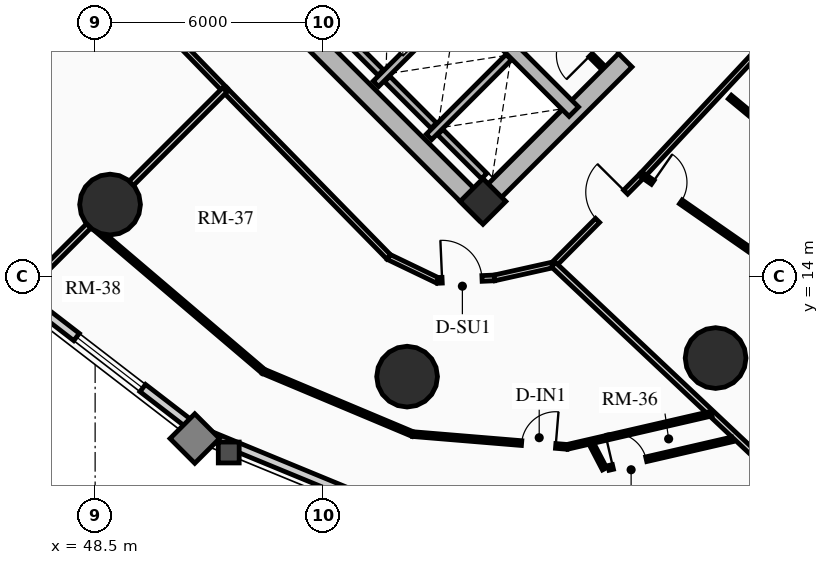
"""IFC4 building model, lengths in metres.
Left out: names, types, materials, properties, quantities, classifications, styles, units other than length and angle.
Written with IfcOpenShell. Run it as: python <this file> out.ifc"""

import sys

from ifc_helpers import new_model, si_unit, direction, frame, frame_2d, origin, origin_2d, place, context, subcontext, project, spatial, rectangle, circle, extrude, source, transform, mapped, element, fill, save


model = new_model("IFC4")
c1 = context("Model", 3, precision=1e-05, world=origin(), true_north=direction((0.0, 1.0)))
c2 = subcontext(c1, "Body", "Model", "MODEL_VIEW")
j1 = project(units=[si_unit("LENGTHUNIT", "METRE"), si_unit("PLANEANGLEUNIT", "RADIAN")], contexts=[c1])
p1 = place(None, origin())
s1 = spatial("IfcSite", under=j1, at=p1, CompositionType="ELEMENT")
p2 = place(p1, origin())
s2 = spatial("IfcBuilding", under=s1, at=p2, CompositionType="ELEMENT")
p3 = place(p2, frame((0.0, 0.0, 39.46)))
s3 = spatial("IfcBuildingStorey", under=s2, at=p3, CompositionType="ELEMENT", Elevation=39.46)
p4 = place(p3, frame((58.773, 15.661, 0.0), z_axis=(0.0, 0.0, 1.0), x_axis=(-0.707106781187, 0.707106781187, 0.0)))
e1 = element("IfcWall", 1, at=p4, inside=s3, PredefinedType="SHEAR", context=c2, shape_type="SweptSolid", body=[
    extrude(rectangle(XDim=14.3, YDim=0.5, at=frame_2d((7.15, 0.0))), origin(), (0.0, 0.0, 1.0), 2.91),
])
p5 = place(p3, frame((58.596, 15.838, 0.0), z_axis=(0.0, 0.0, 1.0), x_axis=(0.707106781187, 0.707106781187, 0.0)))
e2 = element("IfcWall", 2, at=p5, inside=s3, PredefinedType="SHEAR", context=c2, shape_type="SweptSolid", body=[
    extrude(rectangle(XDim=10.7, YDim=0.5, at=frame_2d((5.35, 0.0))), origin(), (0.0, 0.0, 1.0), 2.91),
])
m1 = source(origin(), c2, "Body", "SweptSolid", [
    extrude(rectangle(XDim=1.5, YDim=2.02, at=frame_2d((0.75, 1.01))), frame((0.0, 0.26, 0.0), z_axis=(0.0, -1.0, 0.0), x_axis=(1.0, 0.0, 0.0)), (0.0, 0.0, 1.0), 0.52),
])
p6 = place(p5, frame((5.45, 0.0, 0.0)))
e3 = element("IfcOpeningElement", 3, at=p6, cuts=e2, PredefinedType="OPENING", context=c2, shape_type="MappedRepresentation", body=[
    mapped(m1, transform((0.0, 0.0, 0.0), x_axis=(1.0, 0.0, 0.0), y_axis=(0.0, 1.0, 0.0), z_axis=(0.0, 0.0, 1.0), scale=1.0)),
])
p7 = place(p3, frame((61.096, 18.338, 0.0), z_axis=(0.0, 0.0, 1.0), x_axis=(-0.707106781187, 0.707106781187, 0.0)))
e4 = element("IfcWall", 4, at=p7, inside=s3, PredefinedType="SHEAR", context=c2, shape_type="SweptSolid", body=[
    extrude(rectangle(XDim=13.8, YDim=0.35, at=frame_2d((6.9, 0.0))), origin(), (0.0, 0.0, 1.0), 2.91),
])
m2 = source(origin(), c2, "Body", "SweptSolid", [
    extrude(rectangle(XDim=1.1, YDim=2.015, at=frame_2d((0.55, 1.007))), frame((0.0, 0.185, 0.0), z_axis=(0.0, -1.0, 0.0), x_axis=(1.0, 0.0, 0.0)), (0.0, 0.0, 1.0), 0.37),
])
p8 = place(p7, frame((4.9, 0.0, 0.0)))
e5 = element("IfcOpeningElement", 5, at=p8, cuts=e4, PredefinedType="OPENING", context=c2, shape_type="MappedRepresentation", body=[
    mapped(m2, transform((0.0, 0.0, 0.0), x_axis=(1.0, 0.0, 0.0), y_axis=(0.0, 1.0, 0.0), z_axis=(0.0, 0.0, 1.0), scale=1.0)),
])
m3 = source(origin(), c2, "Body", "SweptSolid", [
    extrude(rectangle(XDim=1.15, YDim=2.02, at=frame_2d((0.575, 1.01))), frame((0.0, 0.185, 0.0), z_axis=(0.0, -1.0, 0.0), x_axis=(1.0, 0.0, 0.0)), (0.0, 0.0, 1.0), 0.37),
])
p9 = place(p7, frame((7.32, 0.0, 0.0)))
e6 = element("IfcOpeningElement", 6, at=p9, cuts=e4, PredefinedType="OPENING", context=c2, shape_type="MappedRepresentation", body=[
    mapped(m3, transform((0.0, 0.0, 0.0), x_axis=(1.0, 0.0, 0.0), y_axis=(0.0, 1.0, 0.0), z_axis=(0.0, 0.0, 1.0), scale=1.0)),
])
p10 = place(p3, frame((58.706, 15.976, 0.0), z_axis=(0.0, 0.0, 1.0), x_axis=(0.707106781187, 0.707106781187, 0.0)))
e7 = element("IfcColumn", 7, at=p10, inside=s3, PredefinedType="COLUMN", context=c2, shape_type="SweptSolid", body=[
    extrude(rectangle(XDim=0.85, YDim=0.85, at=origin_2d()), origin(), (0.0, 0.0, 1.0), 2.91),
])
for number, where, z_axis, x_axis in (
    (8, (48.893, 15.893, 0.0), (0.0, 0.0, 1.0), (1.0, 0.0, 0.0)),
    (9, (56.709, 11.365, 0.0), (0.0, 0.0, 1.0), (1.0, 0.0, 0.0)),
    (10, (64.827, 11.854, 0.0), (0.0, 0.0, 1.0), (1.0, 0.0, 0.0)),
):
    element("IfcColumn", number, at=place(p3, frame(where, z_axis=z_axis, x_axis=x_axis)), inside=s3, PredefinedType="USERDEFINED", context=c2, shape_type="SweptSolid", body=[
        extrude(circle(Radius=0.8, at=origin_2d()), origin(), (0.0, 0.0, 1.0), 2.91),
    ])
p11 = place(p3, frame((51.222, 9.932, 0.0), z_axis=(0.0, 0.0, 1.0), x_axis=(-0.792020182601, 0.610494906082, 0.0)))
e11 = element("IfcWall", 11, at=p11, inside=s3, PredefinedType="SOLIDWALL", context=c2, shape_type="SweptSolid", body=[
    extrude(rectangle(XDim=5.911, YDim=0.24, at=frame_2d((2.956, 0.0))), origin(), (0.0, 0.0, 1.0), 2.073),
])
m4 = source(origin(), c2, "Body", "SweptSolid", [
    extrude(rectangle(XDim=2.2, YDim=1.35, at=frame_2d((1.1, 0.675))), frame((0.0, 0.13, 0.0), z_axis=(0.0, -1.0, 0.0), x_axis=(1.0, 0.0, 0.0)), (0.0, 0.0, 1.0), 0.26),
])
p12 = place(p11, frame((1.855, 0.0, 0.65)))
e12 = element("IfcOpeningElement", 12, at=p12, cuts=e11, PredefinedType="OPENING", context=c2, shape_type="MappedRepresentation", body=[
    mapped(m4, transform((0.0, 0.0, 0.0), x_axis=(1.0, 0.0, 0.0), y_axis=(0.0, 1.0, 0.0), z_axis=(0.0, 0.0, 1.0), scale=1.0)),
])
p13 = place(p3, frame((56.518, 7.749, 0.0), z_axis=(0.0, 0.0, 1.0), x_axis=(-0.924542988536, 0.381077764176, 0.0)))
e13 = element("IfcWall", 13, at=p13, inside=s3, PredefinedType="SOLIDWALL", context=c2, shape_type="SweptSolid", body=[
    extrude(rectangle(XDim=5.728, YDim=0.24, at=frame_2d((2.864, 0.0))), origin(), (0.0, 0.0, 1.0), 2.073),
])
p14 = place(p3, frame((55.888, 19.069, 0.0), z_axis=(0.0, 0.0, 1.0), x_axis=(0.707106781187, 0.707106781187, 0.0)))
e14 = element("IfcWall", 14, at=p14, inside=s3, PredefinedType="SHEAR", context=c2, shape_type="SweptSolid", body=[
    extrude(rectangle(XDim=2.97, YDim=0.2, at=frame_2d((1.485, 0.0))), origin(), (0.0, 0.0, 1.0), 2.91),
])
p15 = place(p3, frame((56.015, 19.366, 0.0), z_axis=(0.0, 0.0, 1.0), x_axis=(-0.707106781187, 0.707106781187, 0.0)))
e15 = element("IfcWall", 15, at=p15, inside=s3, PredefinedType="SHEAR", context=c2, shape_type="SweptSolid", body=[
    extrude(rectangle(XDim=2.44, YDim=0.2, at=frame_2d((1.22, 0.0))), origin(), (0.0, 0.0, 1.0), 2.91),
])
p16 = place(p3, frame((57.284, 17.673, 0.0), z_axis=(0.0, 0.0, 1.0), x_axis=(0.707147878904, 0.70706568108, 0.0)))
e16 = element("IfcWall", 16, at=p16, inside=s3, PredefinedType="SHEAR", context=c2, shape_type="SweptSolid", body=[
    extrude(rectangle(XDim=2.97, YDim=0.2, at=frame_2d((1.485, 0.0))), origin(), (0.0, 0.0, 1.0), 2.91),
])
p17 = place(p3, frame((57.412, 17.97, 0.0), z_axis=(0.0, 0.0, 1.0), x_axis=(-0.707106781187, 0.707106781187, 0.0)))
e17 = element("IfcWall", 17, at=p17, inside=s3, PredefinedType="SHEAR", context=c2, shape_type="SweptSolid", body=[
    extrude(rectangle(XDim=1.735, YDim=0.2, at=frame_2d((0.867, 0.0))), origin(), (0.0, 0.0, 1.0), 2.91),
])
p18 = place(p3, frame((58.737, 16.644, 0.0), z_axis=(0.0, 0.0, 1.0), x_axis=(-0.707032117043, 0.707181437447, 0.0)))
e18 = element("IfcWall", 18, at=p18, inside=s3, PredefinedType="SHEAR", context=c2, shape_type="SweptSolid", body=[
    extrude(rectangle(XDim=1.635, YDim=0.2, at=frame_2d((0.817, 0.0))), origin(), (0.0, 0.0, 1.0), 2.91),
])
p19 = place(p3, frame((61.835, 19.529, 0.0), z_axis=(0.0, 0.0, 1.0), x_axis=(-0.707174592913, 0.707038962956, 0.0)))
e19 = element("IfcWall", 19, at=p19, inside=s3, PredefinedType="PARTITIONING", context=c2, shape_type="SweptSolid", body=[
    extrude(rectangle(XDim=1.8, YDim=0.125, at=frame_2d((0.9, 0.0))), origin(), (0.0, 0.0, 1.0), 2.635),
])
m5 = source(origin(), c2, "Body", "SweptSolid", [
    extrude(rectangle(XDim=0.9, YDim=2.005, at=frame_2d((0.45, 1.002))), frame((0.0, 0.073, 0.0), z_axis=(0.0, -1.0, 0.0), x_axis=(1.0, 0.0, 0.0)), (0.0, 0.0, 1.0), 0.145),
])
p20 = place(p19, frame((0.42, 0.0, 0.0)))
e20 = element("IfcOpeningElement", 20, at=p20, cuts=e19, PredefinedType="OPENING", context=c2, shape_type="MappedRepresentation", body=[
    mapped(m5, transform((0.0, 0.0, 0.0), x_axis=(1.0, 0.0, 0.0), y_axis=(0.0, 1.0, 0.0), z_axis=(0.0, 0.0, 1.0), scale=1.0)),
])
p21 = place(p3, frame((47.706, 23.253, 0.0), z_axis=(0.0, 0.0, 1.0), x_axis=(0.696179266346, -0.717867974707, 0.0)))
e21 = element("IfcWall", 21, at=p21, inside=s3, PredefinedType="PARTITIONING", context=c2, shape_type="SweptSolid", body=[
    extrude(rectangle(XDim=6.045, YDim=0.15, at=frame_2d((3.022, 0.0))), origin(), (0.0, 0.0, 1.0), 2.635),
])
m6 = source(origin(), c2, "Body", "SweptSolid", [
    extrude(rectangle(XDim=1.05, YDim=2.015, at=frame_2d((0.525, 1.007))), frame((0.0, 0.085, 0.0), z_axis=(0.0, -1.0, 0.0), x_axis=(1.0, 0.0, 0.0)), (0.0, 0.0, 1.0), 0.17),
])
p22 = place(p21, frame((2.497, 0.0, 0.0)))
e22 = element("IfcOpeningElement", 22, at=p22, cuts=e21, PredefinedType="OPENING", context=c2, shape_type="MappedRepresentation", body=[
    mapped(m6, transform((0.0, 0.0, 0.0), x_axis=(1.0, 0.0, 0.0), y_axis=(0.0, 1.0, 0.0), z_axis=(0.0, 0.0, 1.0), scale=1.0)),
])
p23 = place(p3, frame((51.914, 18.914, 0.0), z_axis=(0.0, 0.0, 1.0), x_axis=(0.699999313799, -0.714143515465, 0.0)))
e23 = element("IfcWall", 23, at=p23, inside=s3, PredefinedType="PARTITIONING", context=c2, shape_type="SweptSolid", body=[
    extrude(rectangle(XDim=6.162, YDim=0.15, at=frame_2d((3.081, 0.0))), origin(), (0.0, 0.0, 1.0), 2.159),
])
p24 = place(p3, frame((56.227, 14.513, 0.0), z_axis=(0.0, 0.0, 1.0), x_axis=(0.901477579283, -0.432825801044, 0.0)))
e24 = element("IfcWall", 24, at=p24, inside=s3, PredefinedType="PARTITIONING", context=c2, shape_type="SweptSolid", body=[
    extrude(rectangle(XDim=1.424, YDim=0.15, at=frame_2d((0.712, 0.0))), origin(), (0.0, 0.0, 1.0), 2.205),
])
p25 = place(p3, frame((57.511, 13.897, 0.0), z_axis=(0.0, 0.0, 1.0), x_axis=(0.999024538494, 0.044158481476, 0.0)))
e25 = element("IfcWall", 25, at=p25, inside=s3, PredefinedType="PARTITIONING", context=c2, shape_type="SweptSolid", body=[
    extrude(rectangle(XDim=1.498, YDim=0.15, at=frame_2d((0.749, 0.0))), origin(), (0.0, 0.0, 1.0), 2.159),
])
p26 = place(p25, frame((0.12, 0.0, 0.0)))
e26 = element("IfcOpeningElement", 26, at=p26, cuts=e25, PredefinedType="OPENING", context=c2, shape_type="MappedRepresentation", body=[
    mapped(m6, transform((0.0, 0.0, 0.0), x_axis=(1.0, 0.0, 0.0), y_axis=(0.0, 1.0, 0.0), z_axis=(0.0, 0.0, 1.0), scale=1.0)),
])
p27 = place(p3, frame((59.008, 13.963, 0.0), z_axis=(0.0, 0.0, 1.0), x_axis=(0.976020856791, 0.21767702476, 0.0)))
e27 = element("IfcWall", 27, at=p27, inside=s3, PredefinedType="PARTITIONING", context=c2, shape_type="SweptSolid", body=[
    extrude(rectangle(XDim=1.593, YDim=0.15, at=frame_2d((0.796, 0.0))), origin(), (0.0, 0.0, 1.0), 2.205),
])
p28 = place(p3, frame((60.562, 14.31, 0.0), z_axis=(0.0, 0.0, 1.0), x_axis=(0.704566236161, 0.709638230975, 0.0)))
e28 = element("IfcWall", 28, at=p28, inside=s3, PredefinedType="PARTITIONING", context=c2, shape_type="SweptSolid", body=[
    extrude(rectangle(XDim=3.321, YDim=0.15, at=frame_2d((1.661, 0.0))), origin(), (0.0, 0.0, 1.0), 2.159),
])
p29 = place(p28, frame((1.643, 0.0, 0.0)))
e29 = element("IfcOpeningElement", 29, at=p29, cuts=e28, PredefinedType="OPENING", context=c2, shape_type="MappedRepresentation", body=[
    mapped(m6, transform((0.0, 0.0, 0.0), x_axis=(1.0, 0.0, 0.0), y_axis=(0.0, 1.0, 0.0), z_axis=(0.0, 0.0, 1.0), scale=1.0)),
])
p30 = place(p3, frame((62.903, 16.667, 0.0), z_axis=(0.0, 0.0, 1.0), x_axis=(0.682371947497, 0.731005147225, 0.0)))
e30 = element("IfcWall", 30, at=p30, inside=s3, PredefinedType="PARTITIONING", context=c2, shape_type="SweptSolid", body=[
    extrude(rectangle(XDim=6.642, YDim=0.15, at=frame_2d((3.321, 0.0))), origin(), (0.0, 0.0, 1.0), 2.159),
])
p31 = place(p3, frame((51.914, 18.914, 0.0), z_axis=(0.0, 0.0, 1.0), x_axis=(-0.707106781187, -0.707106781187, 0.0)))
e31 = element("IfcWall", 31, at=p31, inside=s3, PredefinedType="PARTITIONING", context=c2, shape_type="SweptSolid", body=[
    extrude(rectangle(XDim=7.579, YDim=0.16, at=frame_2d((3.79, 0.0))), origin(), (0.0, 0.0, 1.0), 2.073),
])
p32 = place(p3, frame((60.562, 14.31, 0.0), z_axis=(0.0, 0.0, 1.0), x_axis=(0.727781661561, -0.685808904211, 0.0)))
e32 = element("IfcWall", 32, at=p32, inside=s3, PredefinedType="PARTITIONING", context=c2, shape_type="SweptSolid", body=[
    extrude(rectangle(XDim=8.655, YDim=0.16, at=frame_2d((4.328, 0.0))), origin(), (0.0, 0.0, 1.0), 2.073),
])
p33 = place(p3, frame((48.377, 15.377, 0.0), z_axis=(0.0, 0.0, 1.0), x_axis=(0.761505943152, -0.648157927163, 0.0)))
e33 = element("IfcWall", 33, at=p33, inside=s3, PredefinedType="PARTITIONING", context=c2, shape_type="SweptSolid", body=[
    extrude(rectangle(XDim=5.979, YDim=0.125, at=frame_2d((2.99, 0.0))), origin(), (0.0, 0.0, 1.0), 2.635),
])
p34 = place(p3, frame((52.93, 11.501, 0.0), z_axis=(0.0, 0.0, 1.0), x_axis=(0.922051248037, -0.387067818338, 0.0)))
e34 = element("IfcWall", 34, at=p34, inside=s3, PredefinedType="PARTITIONING", context=c2, shape_type="SweptSolid", body=[
    extrude(rectangle(XDim=4.26, YDim=0.125, at=frame_2d((2.13, 0.0))), origin(), (0.0, 0.0, 1.0), 2.159),
])
p35 = place(p3, frame((56.858, 9.852, 0.0), z_axis=(0.0, 0.0, 1.0), x_axis=(0.996604967548, -0.082331881181, 0.0)))
e35 = element("IfcWall", 35, at=p35, inside=s3, PredefinedType="PARTITIONING", context=c2, shape_type="SweptSolid", body=[
    extrude(rectangle(XDim=4.077, YDim=0.125, at=frame_2d((2.039, 0.0))), origin(), (0.0, 0.0, 1.0), 2.635),
])
p36 = place(p35, frame((2.874, 0.0, 0.0)))
e36 = element("IfcOpeningElement", 36, at=p36, cuts=e35, PredefinedType="OPENING", context=c2, shape_type="MappedRepresentation", body=[
    mapped(m5, transform((0.0, 0.0, 0.0), x_axis=(1.0, 0.0, 0.0), y_axis=(0.0, 1.0, 0.0), z_axis=(0.0, 0.0, 1.0), scale=1.0)),
])
p37 = place(p3, frame((60.921, 9.517, 0.0), z_axis=(0.0, 0.0, 1.0), x_axis=(0.974453436038, 0.224589627973, 0.0)))
e37 = element("IfcWall", 37, at=p37, inside=s3, PredefinedType="PARTITIONING", context=c2, shape_type="SweptSolid", body=[
    extrude(rectangle(XDim=3.898, YDim=0.125, at=frame_2d((1.949, 0.0))), origin(), (0.0, 0.0, 1.0), 2.205),
])
p38 = place(p3, frame((61.564, 9.589, 0.0), z_axis=(0.0, 0.0, 1.0), x_axis=(0.462168536246, -0.886792108729, 0.0)))
e38 = element("IfcWall", 38, at=p38, inside=s3, PredefinedType="PARTITIONING", context=c2, shape_type="SweptSolid", body=[
    extrude(rectangle(XDim=0.735, YDim=0.125, at=frame_2d((0.367, 0.0))), origin(), (0.0, 0.0, 1.0), 2.635),
])
p39 = place(p3, frame((62.008, 8.962, 0.0), z_axis=(0.0, 0.0, 1.0), x_axis=(0.974365294983, 0.224971713626, 0.0)))
e39 = element("IfcWall", 39, at=p39, inside=s3, PredefinedType="PARTITIONING", context=c2, shape_type="SweptSolid", body=[
    extrude(rectangle(XDim=3.337, YDim=0.125, at=frame_2d((1.668, 0.0))), origin(), (0.0, 0.0, 1.0), 2.635),
])
p40 = place(p39, frame((0.12, 0.0, 0.0)))
e40 = element("IfcOpeningElement", 40, at=p40, cuts=e39, PredefinedType="OPENING", context=c2, shape_type="MappedRepresentation", body=[
    mapped(m5, transform((0.0, 0.0, 0.0), x_axis=(1.0, 0.0, 0.0), y_axis=(0.0, 1.0, 0.0), z_axis=(0.0, 0.0, 1.0), scale=1.0)),
])
p41 = place(p3, frame((62.903, 16.667, 0.0), z_axis=(0.0, 0.0, 1.0), x_axis=(0.820761665638, -0.571270766116, 0.0)))
e41 = element("IfcWall", 41, at=p41, inside=s3, PredefinedType="PARTITIONING", context=c2, shape_type="SweptSolid", body=[
    extrude(rectangle(XDim=9.743, YDim=0.125, at=frame_2d((4.872, 0.0))), origin(), (0.0, 0.0, 1.0), 2.073),
])
p42 = place(p41, frame((0.33, 0.0, 0.0)))
e42 = element("IfcOpeningElement", 42, at=p42, cuts=e41, PredefinedType="OPENING", context=c2, shape_type="MappedRepresentation", body=[
    mapped(m5, transform((0.0, 0.0, 0.0), x_axis=(1.0, 0.0, 0.0), y_axis=(0.0, 1.0, 0.0), z_axis=(0.0, 0.0, 1.0), scale=1.0)),
])
p43 = place(p3, frame((65.202, 18.721, 0.0), z_axis=(0.0, 0.0, 1.0), x_axis=(0.769814202386, -0.638268042287, 0.0)))
e43 = element("IfcWall", 43, at=p43, inside=s3, PredefinedType="PARTITIONING", context=c2, shape_type="SweptSolid", body=[
    extrude(rectangle(XDim=1.769, YDim=0.125, at=frame_2d((0.884, 0.0))), origin(), (0.0, 0.0, 1.0), 2.635),
])
m7 = source(origin(), c2, "Body", "SweptSolid", [
    extrude(rectangle(XDim=2.2, YDim=1.35, at=frame_2d((1.1, 0.675))), frame((0.0, 0.03, 0.0), z_axis=(0.0, -1.0, 0.0), x_axis=(1.0, 0.0, 0.0)), (0.0, 0.0, 1.0), 0.06),
])
p44 = place(p12, origin())
e44 = element("IfcWindow", 44, at=p44, inside=s3, PartitioningType="DOUBLE_PANEL_VERTICAL", PredefinedType="WINDOW", context=c2, shape_type="MappedRepresentation", body=[
    mapped(m7, transform((0.0, 0.0, 0.0), x_axis=(1.0, 0.0, 0.0), y_axis=(0.0, 1.0, 0.0), z_axis=(0.0, 0.0, 1.0), scale=1.0)),
])
fill(e12, e44)
m8 = source(origin(), c2, "Body", "SweptSolid", [
    extrude(rectangle(XDim=1.5, YDim=2.02, at=frame_2d((0.75, 1.01))), frame((0.0, 0.025, 0.0), z_axis=(0.0, -1.0, 0.0), x_axis=(1.0, 0.0, 0.0)), (0.0, 0.0, 1.0), 0.05),
])
p45 = place(p6, origin())
e45 = element("IfcDoor", 45, at=p45, inside=s3, OperationType="DOUBLE_DOOR_SINGLE_SWING", PredefinedType="DOOR", context=c2, shape_type="MappedRepresentation", body=[
    mapped(m8, transform((0.0, 0.0, 0.0), x_axis=(1.0, 0.0, 0.0), y_axis=(0.0, 1.0, 0.0), z_axis=(0.0, 0.0, 1.0), scale=1.0)),
])
fill(e3, e45)
m9 = source(origin(), c2, "Body", "SweptSolid", [
    extrude(rectangle(XDim=0.9, YDim=2.005, at=frame_2d((0.45, 1.002))), frame((0.0, 0.025, 0.0), z_axis=(0.0, -1.0, 0.0), x_axis=(1.0, 0.0, 0.0)), (0.0, 0.0, 1.0), 0.05),
])
p46 = place(p20, origin())
e46 = element("IfcDoor", 46, at=p46, inside=s3, OperationType="SINGLE_SWING_LEFT", PredefinedType="DOOR", context=c2, shape_type="MappedRepresentation", body=[
    mapped(m9, transform((0.0, 0.0, 0.0), x_axis=(1.0, 0.0, 0.0), y_axis=(0.0, 1.0, 0.0), z_axis=(0.0, 0.0, 1.0), scale=1.0)),
])
fill(e20, e46)
m10 = source(origin(), c2, "Body", "SweptSolid", [
    extrude(rectangle(XDim=1.05, YDim=2.015, at=frame_2d((0.525, 1.007))), frame((0.0, 0.025, 0.0), z_axis=(0.0, -1.0, 0.0), x_axis=(1.0, 0.0, 0.0)), (0.0, 0.0, 1.0), 0.05),
])
p47 = place(p26, origin())
e47 = element("IfcDoor", 47, at=p47, inside=s3, OperationType="SINGLE_SWING_LEFT", PredefinedType="DOOR", context=c2, shape_type="MappedRepresentation", body=[
    mapped(m10, transform((0.0, 0.0, 0.0), x_axis=(1.0, 0.0, 0.0), y_axis=(0.0, 1.0, 0.0), z_axis=(0.0, 0.0, 1.0), scale=1.0)),
])
fill(e26, e47)
p48 = place(p36, origin())
e48 = element("IfcDoor", 48, at=p48, inside=s3, OperationType="SINGLE_SWING_RIGHT", PredefinedType="DOOR", context=c2, shape_type="MappedRepresentation", body=[
    mapped(m9, transform((0.0, 0.0, 0.0), x_axis=(1.0, 0.0, 0.0), y_axis=(0.0, 1.0, 0.0), z_axis=(0.0, 0.0, 1.0), scale=1.0)),
])
fill(e36, e48)
p49 = place(p40, origin())
e49 = element("IfcDoor", 49, at=p49, inside=s3, OperationType="SINGLE_SWING_LEFT", PredefinedType="DOOR", context=c2, shape_type="MappedRepresentation", body=[
    mapped(m9, transform((0.0, 0.0, 0.0), x_axis=(1.0, 0.0, 0.0), y_axis=(0.0, 1.0, 0.0), z_axis=(0.0, 0.0, 1.0), scale=1.0)),
])
fill(e40, e49)
p50 = place(p29, origin())
e50 = element("IfcDoor", 50, at=p50, inside=s3, OperationType="SINGLE_SWING_RIGHT", PredefinedType="DOOR", context=c2, shape_type="MappedRepresentation", body=[
    mapped(m10, transform((0.0, 0.0, 0.0), x_axis=(1.0, 0.0, 0.0), y_axis=(0.0, 1.0, 0.0), z_axis=(0.0, 0.0, 1.0), scale=1.0)),
])
fill(e29, e50)
p51 = place(p42, origin())
e51 = element("IfcDoor", 51, at=p51, inside=s3, OperationType="SINGLE_SWING_LEFT", PredefinedType="DOOR", context=c2, shape_type="MappedRepresentation", body=[
    mapped(m9, transform((0.0, 0.0, 0.0), x_axis=(1.0, 0.0, 0.0), y_axis=(0.0, 1.0, 0.0), z_axis=(0.0, 0.0, 1.0), scale=1.0)),
])
fill(e42, e51)
save(model, sys.argv[1])
